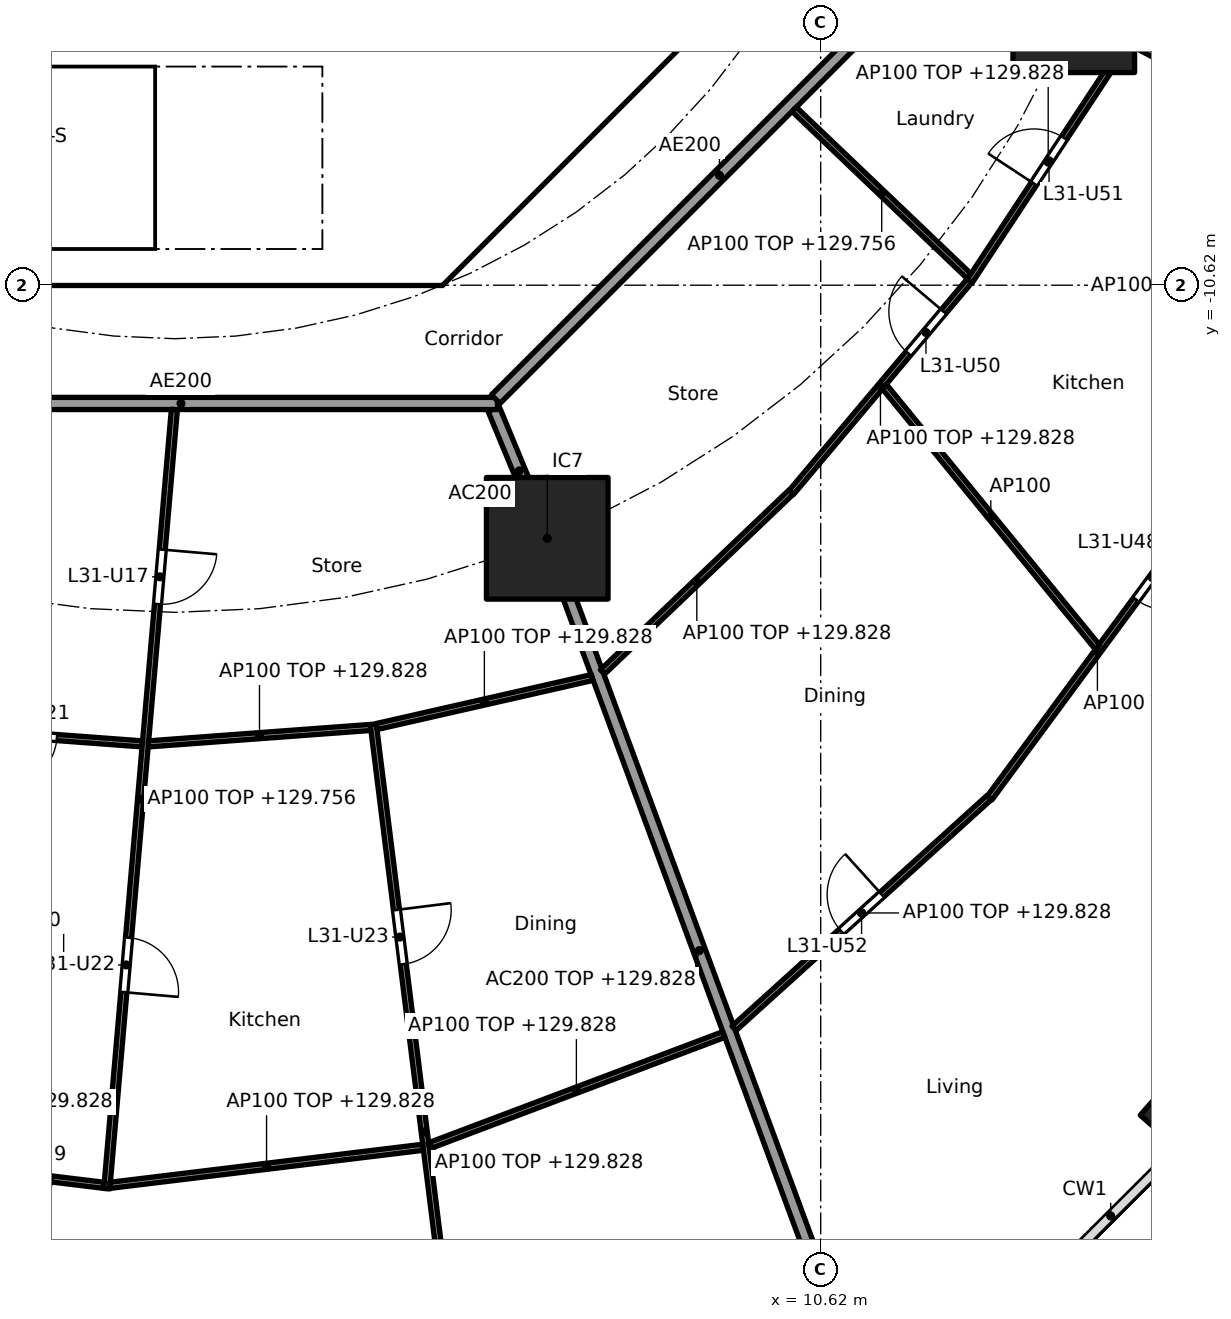
"""IFC4 building model, lengths in metres.
Left out: names, types, materials, properties, quantities, classifications, styles, units other than length and angle.
Written with IfcOpenShell. Run it as: python <this file> out.ifc"""

import sys

from ifc_helpers import new_model, si_unit, direction, frame, frame_2d, origin, origin_2d, place, context, subcontext, project, spatial, polyline, rectangle, hollow_rectangle, outline, extrude, element, fill, save


model = new_model("IFC4")
c1 = context("Model", 3, precision=1e-05, world=origin(), true_north=direction((0.0, 1.0)))
c2 = subcontext(c1, "Body", "Model", "MODEL_VIEW")
j1 = project(units=[si_unit("LENGTHUNIT", "METRE"), si_unit("PLANEANGLEUNIT", "RADIAN")], contexts=[c1])
p1 = place(None, origin())
s1 = spatial("IfcSite", under=j1, at=p1, CompositionType="ELEMENT")
p2 = place(p1, origin())
s2 = spatial("IfcBuilding", under=s1, at=p2, CompositionType="ELEMENT")
p3 = place(p2, frame((0.0, 0.0, 127.0)))
s3 = spatial("IfcBuildingStorey", under=s2, at=p3, CompositionType="ELEMENT", Elevation=127.0)
p4 = place(p3, frame((16.61, -24.115, 0.0), z_axis=(0.0, 0.0, 1.0), x_axis=(0.660114607735, 0.751164898445, 0.0)))
e1 = element("IfcColumn", 1, at=p4, inside=s3, PredefinedType="COLUMN", context=c2, shape_type="SweptSolid", body=[
    extrude(hollow_rectangle(XDim=1.2, YDim=0.9, WallThickness=0.04, at=origin_2d()), origin(), (0.0, 0.0, 1.0), 3.7),
])
for number, where, z_axis, x_axis in (
    (2, (6.123, -14.782, 0.0), (0.0, 0.0, 1.0), (1.0, 0.0, 0.0)),
    (3, (14.782, -6.123, 0.0), (0.0, 0.0, 1.0), (1.0, 0.0, 0.0)),
):
    element("IfcColumn", number, at=place(p3, frame(where, z_axis=z_axis, x_axis=x_axis)), inside=s3, PredefinedType="COLUMN", context=c2, shape_type="SweptSolid", body=[
        extrude(rectangle(XDim=2.0, YDim=2.0, at=origin_2d()), origin(), (0.0, 0.0, 1.0), 3.7),
    ])
p5 = place(p3, frame((4.613, -9.988, 0.0), z_axis=(0.0, 0.0, 1.0), x_axis=(0.707106781187, 0.707106781187, 0.0)))
e4 = element("IfcWall", 4, at=p5, inside=s3, PredefinedType="SHEAR", context=c2, shape_type="SweptSolid", body=[
    extrude(rectangle(XDim=7.602, YDim=0.6, at=frame_2d((3.801, 0.0))), origin(), (0.0, 0.0, 1.0), 3.44),
])
p6 = place(p5, frame((3.201, 0.0, 0.0)))
e5 = element("IfcOpeningElement", 5, at=p6, cuts=e4, PredefinedType="OPENING", context=c2, shape_type="SweptSolid", body=[
    extrude(rectangle(XDim=1.2, YDim=2.1, at=frame_2d((0.6, 1.05))), frame((0.0, 0.31, 0.0), z_axis=(0.0, -1.0, 0.0), x_axis=(1.0, 0.0, 0.0)), (0.0, 0.0, 1.0), 0.62),
])
p7 = place(p3, frame((4.0, -10.025, 0.0), z_axis=(0.0, 0.0, 1.0), x_axis=(0.0, 1.0, 0.0)))
e6 = element("IfcWall", 6, at=p7, inside=s3, PredefinedType="SOLIDWALL", context=c2, shape_type="SweptSolid", body=[
    extrude(rectangle(XDim=3.0, YDim=0.2, at=frame_2d((1.5, 0.0))), origin(), (0.0, 0.0, 1.0), 3.44),
])
p8 = place(p7, frame((0.975, 0.0, 0.0)))
e7 = element("IfcOpeningElement", 7, at=p8, cuts=e6, PredefinedType="OPENING", context=c2, shape_type="SweptSolid", body=[
    extrude(rectangle(XDim=1.1, YDim=2.1, at=frame_2d((0.55, 1.05))), frame((0.0, 0.11, 0.0), z_axis=(0.0, -1.0, 0.0), x_axis=(1.0, 0.0, 0.0)), (0.0, 0.0, 1.0), 0.22),
])
p9 = place(p3, origin())
e8 = element("IfcWall", 8, at=p9, inside=s3, PredefinedType="SHEAR", context=c2, shape_type="SweptSolid", body=[
    extrude(outline(polyline([(-4.152, -10.025), (4.152, -10.025), (4.401, -9.776), (4.825, -10.2), (4.401, -10.625), (-4.401, -10.625), (-4.825, -10.2), (-4.401, -9.776), (-4.152, -10.025)])), origin(), (0.0, 0.0, 1.0), 3.44),
])
p10 = place(p3, origin())
e9 = element("IfcWall", 9, at=p10, inside=s3, PredefinedType="SOLIDWALL", context=c2, shape_type="SweptSolid", body=[
    extrude(outline(polyline([(4.1, -7.025), (-4.1, -7.025), (-4.1, -6.5), (4.1, -6.5), (4.1, -7.025)])), origin(), (0.0, 0.0, 1.0), 3.44),
])
p11 = place(p3, frame((5.243, -12.657, 0.0), z_axis=(0.0, 0.0, 1.0), x_axis=(0.38273085373, -0.923859888513, 0.0)))
e10 = element("IfcWall", 10, at=p11, inside=s3, PredefinedType="PARTITIONING", context=c2, shape_type="SweptSolid", body=[
    extrude(rectangle(XDim=2.199, YDim=0.2, at=frame_2d((1.1, 0.0))), origin(), (0.0, 0.0, 1.0), 3.44),
])
p12 = place(p3, frame((6.14, -14.829, 0.0), z_axis=(0.0, 0.0, 1.0), x_axis=(0.346169582481, -0.938171956608, 0.0)))
e11 = element("IfcWall", 11, at=p12, inside=s3, PredefinedType="PARTITIONING", context=c2, shape_type="SweptSolid", body=[
    extrude(rectangle(XDim=14.354, YDim=0.2, at=frame_2d((7.177, 0.0))), origin(), (0.0, 0.0, 1.0), 2.828),
])
p13 = place(p3, frame((-5.104, -12.565, 0.0), z_axis=(0.0, 0.0, 1.0), x_axis=(1.0, 0.0, 0.0)))
e12 = element("IfcWall", 12, at=p13, inside=s3, PredefinedType="PARTITIONING", context=c2, shape_type="SweptSolid", body=[
    extrude(rectangle(XDim=10.409, YDim=0.2, at=frame_2d((5.205, 0.0))), origin(), (0.0, 0.0, 1.0), 3.44),
])
p14 = place(p3, frame((5.275, -12.494, 0.0), z_axis=(0.0, 0.0, 1.0), x_axis=(0.707106781187, 0.707106781187, 0.0)))
e13 = element("IfcWall", 13, at=p14, inside=s3, PredefinedType="PARTITIONING", context=c2, shape_type="SweptSolid", body=[
    extrude(rectangle(XDim=10.409, YDim=0.2, at=frame_2d((5.205, 0.0))), origin(), (0.0, 0.0, 1.0), 3.44),
])
p15 = place(p3, frame((-4.29, -17.885, 0.0), z_axis=(0.0, 0.0, 1.0), x_axis=(0.997272353708, -0.073809569363, 0.0)))
e14 = element("IfcWall", 14, at=p15, inside=s3, PredefinedType="PARTITIONING", context=c2, shape_type="SweptSolid", body=[
    extrude(rectangle(XDim=3.764, YDim=0.1, at=frame_2d((1.882, 0.0))), origin(), (0.0, 0.0, 1.0), 2.828),
])
p16 = place(p15, frame((1.457, 0.0, 0.0)))
e15 = element("IfcOpeningElement", 15, at=p16, cuts=e14, PredefinedType="OPENING", context=c2, shape_type="SweptSolid", body=[
    extrude(rectangle(XDim=0.9, YDim=2.1, at=frame_2d((0.45, 1.05))), frame((0.0, 0.06, 0.0), z_axis=(0.0, -1.0, 0.0), x_axis=(1.0, 0.0, 0.0)), (0.0, 0.0, 1.0), 0.12),
])
p17 = place(p3, frame((-6.413, -24.784, 0.0), z_axis=(0.0, 0.0, 1.0), x_axis=(0.992690077723, -0.120691381588, 0.0)))
e16 = element("IfcWall", 16, at=p17, inside=s3, PredefinedType="PARTITIONING", context=c2, shape_type="SweptSolid", body=[
    extrude(rectangle(XDim=5.286, YDim=0.1, at=frame_2d((2.643, 0.0))), origin(), (0.0, 0.0, 1.0), 2.828),
])
p18 = place(p17, frame((3.539, 0.0, 0.0)))
e17 = element("IfcOpeningElement", 17, at=p18, cuts=e16, PredefinedType="OPENING", context=c2, shape_type="SweptSolid", body=[
    extrude(rectangle(XDim=0.9, YDim=2.1, at=frame_2d((0.45, 1.05))), frame((0.0, 0.06, 0.0), z_axis=(0.0, -1.0, 0.0), x_axis=(1.0, 0.0, 0.0)), (0.0, 0.0, 1.0), 0.12),
])
p19 = place(p3, frame((-0.009, -12.664, 0.0), z_axis=(0.0, 0.0, 1.0), x_axis=(-0.086441225464, -0.996256952066, 0.0)))
e18 = element("IfcWall", 18, at=p19, inside=s3, PredefinedType="PARTITIONING", context=c2, shape_type="SweptSolid", body=[
    extrude(rectangle(XDim=12.862, YDim=0.1, at=frame_2d((6.431, 0.0))), origin(), (0.0, 0.0, 1.0), 2.756),
])
p20 = place(p19, frame((2.312, 0.0, 0.0)))
e19 = element("IfcOpeningElement", 19, at=p20, cuts=e18, PredefinedType="OPENING", context=c2, shape_type="SweptSolid", body=[
    extrude(rectangle(XDim=0.9, YDim=2.1, at=frame_2d((0.45, 1.05))), frame((0.0, 0.06, 0.0), z_axis=(0.0, -1.0, 0.0), x_axis=(1.0, 0.0, 0.0)), (0.0, 0.0, 1.0), 0.12),
])
p21 = place(p19, frame((8.718, 0.0, 0.0)))
e20 = element("IfcOpeningElement", 20, at=p21, cuts=e18, PredefinedType="OPENING", context=c2, shape_type="SweptSolid", body=[
    extrude(rectangle(XDim=0.9, YDim=2.1, at=frame_2d((0.45, 1.05))), frame((0.0, 0.06, 0.0), z_axis=(0.0, -1.0, 0.0), x_axis=(1.0, 0.0, 0.0)), (0.0, 0.0, 1.0), 0.12),
])
p22 = place(p3, frame((-0.436, -18.163, 0.0), z_axis=(0.0, 0.0, 1.0), x_axis=(0.997271025958, 0.073827506966, 0.0)))
e21 = element("IfcWall", 21, at=p22, inside=s3, PredefinedType="PARTITIONING", context=c2, shape_type="SweptSolid", body=[
    extrude(rectangle(XDim=3.664, YDim=0.1, at=frame_2d((1.832, 0.0))), origin(), (0.0, 0.0, 1.0), 2.828),
])
p23 = place(p3, frame((-1.066, -25.422, 0.0), z_axis=(0.0, 0.0, 1.0), x_axis=(0.992692993044, 0.120667400577, 0.0)))
e22 = element("IfcWall", 22, at=p23, inside=s3, PredefinedType="PARTITIONING", context=c2, shape_type="SweptSolid", body=[
    extrude(rectangle(XDim=5.186, YDim=0.1, at=frame_2d((2.593, 0.0))), origin(), (0.0, 0.0, 1.0), 2.828),
])
p24 = place(p3, frame((3.262, -17.839, 0.0), z_axis=(0.0, 0.0, 1.0), x_axis=(0.124074750982, -0.992272873845, 0.0)))
e23 = element("IfcWall", 23, at=p24, inside=s3, PredefinedType="PARTITIONING", context=c2, shape_type="SweptSolid", body=[
    extrude(rectangle(XDim=13.516, YDim=0.1, at=frame_2d((6.758, 0.0))), origin(), (0.0, 0.0, 1.0), 2.828),
])
p25 = place(p24, frame((3.078, 0.0, 0.0)))
e24 = element("IfcOpeningElement", 24, at=p25, cuts=e23, PredefinedType="OPENING", context=c2, shape_type="SweptSolid", body=[
    extrude(rectangle(XDim=0.9, YDim=2.1, at=frame_2d((0.45, 1.05))), frame((0.0, 0.06, 0.0), z_axis=(0.0, -1.0, 0.0), x_axis=(1.0, 0.0, 0.0)), (0.0, 0.0, 1.0), 0.12),
])
p26 = place(p24, frame((9.811, 0.0, 0.0)))
e25 = element("IfcOpeningElement", 25, at=p26, cuts=e23, PredefinedType="OPENING", context=c2, shape_type="SweptSolid", body=[
    extrude(rectangle(XDim=0.9, YDim=2.1, at=frame_2d((0.45, 1.05))), frame((0.0, 0.06, 0.0), z_axis=(0.0, -1.0, 0.0), x_axis=(1.0, 0.0, 0.0)), (0.0, 0.0, 1.0), 0.12),
])
p27 = place(p3, frame((3.317, -17.878, 0.0), z_axis=(0.0, 0.0, 1.0), x_axis=(0.975095905288, 0.221783623135, 0.0)))
e26 = element("IfcWall", 26, at=p27, inside=s3, PredefinedType="PARTITIONING", context=c2, shape_type="SweptSolid", body=[
    extrude(rectangle(XDim=3.636, YDim=0.1, at=frame_2d((1.818, 0.0))), origin(), (0.0, 0.0, 1.0), 2.828),
])
p28 = place(p3, frame((4.178, -24.773, 0.0), z_axis=(0.0, 0.0, 1.0), x_axis=(0.935583811437, 0.353104703702, 0.0)))
e27 = element("IfcWall", 27, at=p28, inside=s3, PredefinedType="PARTITIONING", context=c2, shape_type="SweptSolid", body=[
    extrude(rectangle(XDim=5.184, YDim=0.1, at=frame_2d((2.592, 0.0))), origin(), (0.0, 0.0, 1.0), 2.828),
])
p29 = place(p3, frame((7.032, -16.98, 0.0), z_axis=(0.0, 0.0, 1.0), x_axis=(0.723709759148, 0.690104473622, 0.0)))
e28 = element("IfcWall", 28, at=p29, inside=s3, PredefinedType="PARTITIONING", context=c2, shape_type="SweptSolid", body=[
    extrude(rectangle(XDim=4.286, YDim=0.1, at=frame_2d((2.143, 0.0))), origin(), (0.0, 0.0, 1.0), 2.828),
])
p30 = place(p3, frame((9.195, -22.84, 0.0), z_axis=(0.0, 0.0, 1.0), x_axis=(0.741675855479, 0.670758470241, 0.0)))
e29 = element("IfcWall", 29, at=p30, inside=s3, PredefinedType="PARTITIONING", context=c2, shape_type="SweptSolid", body=[
    extrude(rectangle(XDim=5.656, YDim=0.1, at=frame_2d((2.828, 0.0))), origin(), (0.0, 0.0, 1.0), 2.828),
])
p31 = place(p30, frame((2.378, 0.0, 0.0)))
e30 = element("IfcOpeningElement", 30, at=p31, cuts=e29, PredefinedType="OPENING", context=c2, shape_type="SweptSolid", body=[
    extrude(rectangle(XDim=0.9, YDim=2.1, at=frame_2d((0.45, 1.05))), frame((0.0, 0.06, 0.0), z_axis=(0.0, -1.0, 0.0), x_axis=(1.0, 0.0, 0.0)), (0.0, 0.0, 1.0), 0.12),
])
p32 = place(p3, frame((10.138, -14.026, 0.0), z_axis=(0.0, 0.0, 1.0), x_axis=(0.644051444483, 0.764982180746, 0.0)))
e31 = element("IfcWall", 31, at=p32, inside=s3, PredefinedType="PARTITIONING", context=c2, shape_type="SweptSolid", body=[
    extrude(rectangle(XDim=4.548, YDim=0.1, at=frame_2d((2.274, 0.0))), origin(), (0.0, 0.0, 1.0), 2.828),
])
p33 = place(p32, frame((2.986, 0.0, 0.0)))
e32 = element("IfcOpeningElement", 32, at=p33, cuts=e31, PredefinedType="OPENING", context=c2, shape_type="SweptSolid", body=[
    extrude(rectangle(XDim=0.9, YDim=2.1, at=frame_2d((0.45, 1.05))), frame((0.0, 0.06, 0.0), z_axis=(0.0, -1.0, 0.0), x_axis=(1.0, 0.0, 0.0)), (0.0, 0.0, 1.0), 0.12),
])
p34 = place(p3, frame((13.397, -19.053, 0.0), z_axis=(0.0, 0.0, 1.0), x_axis=(0.593522299069, 0.804817544856, 0.0)))
e33 = element("IfcWall", 33, at=p34, inside=s3, PredefinedType="PARTITIONING", context=c2, shape_type="SweptSolid", body=[
    extrude(rectangle(XDim=5.976, YDim=0.1, at=frame_2d((2.988, 0.0))), origin(), (0.0, 0.0, 1.0), 2.828),
])
p35 = place(p34, frame((4.057, 0.0, 0.0)))
e34 = element("IfcOpeningElement", 34, at=p35, cuts=e33, PredefinedType="OPENING", context=c2, shape_type="SweptSolid", body=[
    extrude(rectangle(XDim=0.9, YDim=2.1, at=frame_2d((0.45, 1.05))), frame((0.0, 0.06, 0.0), z_axis=(0.0, -1.0, 0.0), x_axis=(1.0, 0.0, 0.0)), (0.0, 0.0, 1.0), 0.12),
])
p36 = place(p3, frame((11.667, -12.287, 0.0), z_axis=(0.0, 0.0, 1.0), x_axis=(0.633038312428, -0.774120465431, 0.0)))
e35 = element("IfcWall", 35, at=p36, inside=s3, PredefinedType="PARTITIONING", context=c2, shape_type="SweptSolid", body=[
    extrude(rectangle(XDim=5.532, YDim=0.1, at=frame_2d((2.766, 0.0))), origin(), (0.0, 0.0, 1.0), 3.44),
])
p37 = place(p3, frame((10.184, -7.727, 0.0), z_axis=(0.0, 0.0, 1.0), x_axis=(0.723654892782, -0.690162007179, 0.0)))
e36 = element("IfcWall", 36, at=p37, inside=s3, PredefinedType="PARTITIONING", context=c2, shape_type="SweptSolid", body=[
    extrude(rectangle(XDim=3.98, YDim=0.1, at=frame_2d((1.99, 0.0))), origin(), (0.0, 0.0, 1.0), 2.756),
])
p38 = place(p3, frame((13.072, -10.55, 0.0), z_axis=(0.0, 0.0, 1.0), x_axis=(0.550614843759, 0.834759422727, 0.0)))
e37 = element("IfcWall", 37, at=p38, inside=s3, PredefinedType="PARTITIONING", context=c2, shape_type="SweptSolid", body=[
    extrude(rectangle(XDim=4.683, YDim=0.1, at=frame_2d((2.341, 0.0))), origin(), (0.0, 0.0, 1.0), 2.828),
])
p39 = place(p38, frame((1.917, 0.0, 0.0)))
e38 = element("IfcOpeningElement", 38, at=p39, cuts=e37, PredefinedType="OPENING", context=c2, shape_type="SweptSolid", body=[
    extrude(rectangle(XDim=0.9, YDim=2.1, at=frame_2d((0.45, 1.05))), frame((0.0, 0.06, 0.0), z_axis=(0.0, -1.0, 0.0), x_axis=(1.0, 0.0, 0.0)), (0.0, 0.0, 1.0), 0.12),
])
p40 = place(p3, frame((14.826, -6.146, 0.0), z_axis=(0.0, 0.0, 1.0), x_axis=(0.883012998471, -0.469348532044, 0.0)))
e39 = element("IfcWall", 39, at=p40, inside=s3, PredefinedType="PARTITIONING", context=c2, shape_type="SweptSolid", body=[
    extrude(rectangle(XDim=9.172, YDim=0.1, at=frame_2d((4.586, 0.0))), origin(), (0.0, 0.0, 1.0), 2.828),
])
p41 = place(p40, frame((2.728, 0.0, 0.0)))
e40 = element("IfcOpeningElement", 40, at=p41, cuts=e39, PredefinedType="OPENING", context=c2, shape_type="SweptSolid", body=[
    extrude(rectangle(XDim=0.9, YDim=2.1, at=frame_2d((0.45, 1.05))), frame((0.0, 0.06, 0.0), z_axis=(0.0, -1.0, 0.0), x_axis=(1.0, 0.0, 0.0)), (0.0, 0.0, 1.0), 0.12),
])
p42 = place(p8, origin())
e41 = element("IfcDoor", 41, at=p42, inside=s3, OperationType="SINGLE_SWING_RIGHT", PredefinedType="DOOR", context=c2, shape_type="SweptSolid", body=[
    extrude(rectangle(XDim=1.1, YDim=2.1, at=frame_2d((0.55, 1.05))), frame((0.0, 0.025, 0.0), z_axis=(0.0, -1.0, 0.0), x_axis=(1.0, 0.0, 0.0)), (0.0, 0.0, 1.0), 0.05),
])
fill(e7, e41)
p43 = place(p6, origin())
e42 = element("IfcDoor", 42, at=p43, inside=s3, OperationType="SINGLE_SWING_RIGHT", PredefinedType="DOOR", context=c2, shape_type="SweptSolid", body=[
    extrude(rectangle(XDim=1.2, YDim=2.1, at=frame_2d((0.6, 1.05))), frame((0.0, 0.025, 0.0), z_axis=(0.0, -1.0, 0.0), x_axis=(1.0, 0.0, 0.0)), (0.0, 0.0, 1.0), 0.05),
])
fill(e5, e42)
p44 = place(p20, origin())
e43 = element("IfcDoor", 43, at=p44, inside=s3, OperationType="SINGLE_SWING_LEFT", PredefinedType="DOOR", context=c2, shape_type="SweptSolid", body=[
    extrude(rectangle(XDim=0.9, YDim=2.1, at=frame_2d((0.45, 1.05))), frame((0.0, 0.025, 0.0), z_axis=(0.0, -1.0, 0.0), x_axis=(1.0, 0.0, 0.0)), (0.0, 0.0, 1.0), 0.05),
])
fill(e19, e43)
p45 = place(p16, frame((0.9, 0.0, 0.0), x_axis=(-1.0, 0.0, 0.0)))
e44 = element("IfcDoor", 44, at=p45, inside=s3, OperationType="SINGLE_SWING_RIGHT", PredefinedType="DOOR", context=c2, shape_type="SweptSolid", body=[
    extrude(rectangle(XDim=0.9, YDim=2.1, at=frame_2d((0.45, 1.05))), frame((0.0, 0.025, 0.0), z_axis=(0.0, -1.0, 0.0), x_axis=(1.0, 0.0, 0.0)), (0.0, 0.0, 1.0), 0.05),
])
fill(e15, e44)
p46 = place(p21, origin())
e45 = element("IfcDoor", 45, at=p46, inside=s3, OperationType="SINGLE_SWING_RIGHT", PredefinedType="DOOR", context=c2, shape_type="SweptSolid", body=[
    extrude(rectangle(XDim=0.9, YDim=2.1, at=frame_2d((0.45, 1.05))), frame((0.0, 0.025, 0.0), z_axis=(0.0, -1.0, 0.0), x_axis=(1.0, 0.0, 0.0)), (0.0, 0.0, 1.0), 0.05),
])
fill(e20, e45)
p47 = place(p25, origin())
e46 = element("IfcDoor", 46, at=p47, inside=s3, OperationType="SINGLE_SWING_LEFT", PredefinedType="DOOR", context=c2, shape_type="SweptSolid", body=[
    extrude(rectangle(XDim=0.9, YDim=2.1, at=frame_2d((0.45, 1.05))), frame((0.0, 0.025, 0.0), z_axis=(0.0, -1.0, 0.0), x_axis=(1.0, 0.0, 0.0)), (0.0, 0.0, 1.0), 0.05),
])
fill(e24, e46)
p48 = place(p18, frame((0.9, 0.0, 0.0), x_axis=(-1.0, 0.0, 0.0)))
e47 = element("IfcDoor", 47, at=p48, inside=s3, OperationType="SINGLE_SWING_RIGHT", PredefinedType="DOOR", context=c2, shape_type="SweptSolid", body=[
    extrude(rectangle(XDim=0.9, YDim=2.1, at=frame_2d((0.45, 1.05))), frame((0.0, 0.025, 0.0), z_axis=(0.0, -1.0, 0.0), x_axis=(1.0, 0.0, 0.0)), (0.0, 0.0, 1.0), 0.05),
])
fill(e17, e47)
p49 = place(p35, frame((0.9, 0.0, 0.0), x_axis=(-1.0, 0.0, 0.0)))
e48 = element("IfcDoor", 48, at=p49, inside=s3, OperationType="SINGLE_SWING_LEFT", PredefinedType="DOOR", context=c2, shape_type="SweptSolid", body=[
    extrude(rectangle(XDim=0.9, YDim=2.1, at=frame_2d((0.45, 1.05))), frame((0.0, 0.025, 0.0), z_axis=(0.0, -1.0, 0.0), x_axis=(1.0, 0.0, 0.0)), (0.0, 0.0, 1.0), 0.05),
])
fill(e34, e48)
p50 = place(p33, origin())
e49 = element("IfcDoor", 49, at=p50, inside=s3, OperationType="SINGLE_SWING_RIGHT", PredefinedType="DOOR", context=c2, shape_type="SweptSolid", body=[
    extrude(rectangle(XDim=0.9, YDim=2.1, at=frame_2d((0.45, 1.05))), frame((0.0, 0.025, 0.0), z_axis=(0.0, -1.0, 0.0), x_axis=(1.0, 0.0, 0.0)), (0.0, 0.0, 1.0), 0.05),
])
fill(e32, e49)
p51 = place(p39, origin())
e50 = element("IfcDoor", 50, at=p51, inside=s3, OperationType="SINGLE_SWING_LEFT", PredefinedType="DOOR", context=c2, shape_type="SweptSolid", body=[
    extrude(rectangle(XDim=0.9, YDim=2.1, at=frame_2d((0.45, 1.05))), frame((0.0, 0.025, 0.0), z_axis=(0.0, -1.0, 0.0), x_axis=(1.0, 0.0, 0.0)), (0.0, 0.0, 1.0), 0.05),
])
fill(e38, e50)
p52 = place(p31, origin())
e51 = element("IfcDoor", 51, at=p52, inside=s3, OperationType="SINGLE_SWING_RIGHT", PredefinedType="DOOR", context=c2, shape_type="SweptSolid", body=[
    extrude(rectangle(XDim=0.9, YDim=2.1, at=frame_2d((0.45, 1.05))), frame((0.0, 0.025, 0.0), z_axis=(0.0, -1.0, 0.0), x_axis=(1.0, 0.0, 0.0)), (0.0, 0.0, 1.0), 0.05),
])
fill(e30, e51)
save(model, sys.argv[1])
